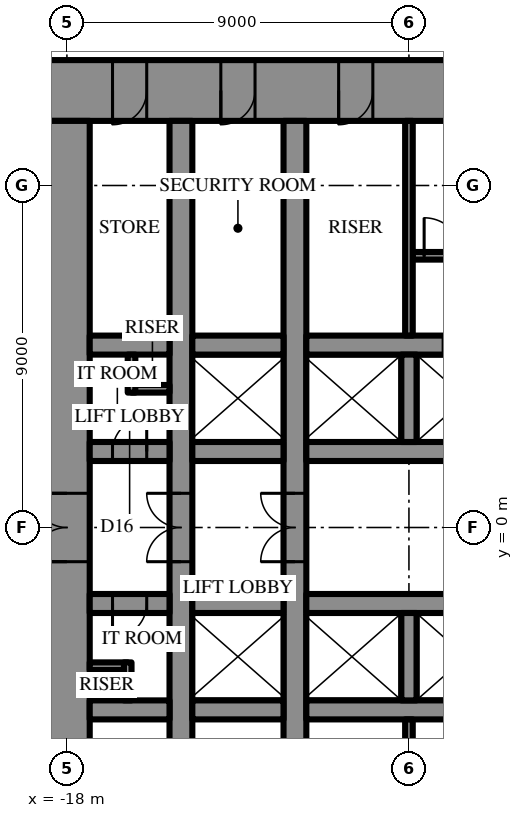
"""IFC4 building model, lengths in metres.
Left out: names, types, materials, properties, quantities, classifications, styles, units other than length and angle.
Written with IfcOpenShell. Run it as: python <this file> out.ifc"""

import sys

from ifc_helpers import new_model, si_unit, direction, frame, frame_2d, origin, place, context, subcontext, project, spatial, rectangle, extrude, element, fill, save


model = new_model("IFC4")
c1 = context("Model", 3, precision=1e-05, world=origin(), true_north=direction((0.0, 1.0)))
c2 = subcontext(c1, "Body", "Model", "MODEL_VIEW")
j1 = project(units=[si_unit("LENGTHUNIT", "METRE"), si_unit("PLANEANGLEUNIT", "RADIAN")], contexts=[c1])
p1 = place(None, origin())
s1 = spatial("IfcSite", under=j1, at=p1, CompositionType="ELEMENT")
p2 = place(p1, origin())
s2 = spatial("IfcBuilding", under=s1, at=p2, CompositionType="ELEMENT")
p3 = place(p2, frame((0.0, 0.0, 132.1)))
s3 = spatial("IfcBuildingStorey", under=s2, at=p3, CompositionType="ELEMENT", Elevation=132.1)
p4 = place(p3, frame((-18.6, 11.5, 0.0), z_axis=(0.0, 0.0, 1.0), x_axis=(1.0, 0.0, 0.0)))
e1 = element("IfcWall", 1, at=p4, inside=s3, PredefinedType="SHEAR", context=c2, shape_type="SweptSolid", body=[
    extrude(rectangle(XDim=37.2, YDim=1.6, at=frame_2d((18.6, 0.0))), origin(), (0.0, 0.0, 1.0), 4.2),
])
p5 = place(p4, frame((19.45, 0.0, 0.0)))
e2 = element("IfcOpeningElement", 2, at=p5, cuts=e1, PredefinedType="OPENING", context=c2, shape_type="SweptSolid", body=[
    extrude(rectangle(XDim=0.9, YDim=2.2, at=frame_2d((0.45, 1.1))), frame((0.0, 0.81, 0.0), z_axis=(0.0, -1.0, 0.0), x_axis=(1.0, 0.0, 0.0)), (0.0, 0.0, 1.0), 1.62),
])
p6 = place(p4, frame((22.45, 0.0, 0.0)))
e3 = element("IfcOpeningElement", 3, at=p6, cuts=e1, PredefinedType="OPENING", context=c2, shape_type="SweptSolid", body=[
    extrude(rectangle(XDim=0.9, YDim=2.2, at=frame_2d((0.45, 1.1))), frame((0.0, 0.81, 0.0), z_axis=(0.0, -1.0, 0.0), x_axis=(1.0, 0.0, 0.0)), (0.0, 0.0, 1.0), 1.62),
])
p7 = place(p4, frame((25.5, 0.0, 0.0)))
e4 = element("IfcOpeningElement", 4, at=p7, cuts=e1, PredefinedType="OPENING", context=c2, shape_type="SweptSolid", body=[
    extrude(rectangle(XDim=1.0, YDim=2.2, at=frame_2d((0.5, 1.1))), frame((0.0, 0.81, 0.0), z_axis=(0.0, -1.0, 0.0), x_axis=(1.0, 0.0, 0.0)), (0.0, 0.0, 1.0), 1.62),
])
p8 = place(p4, frame((1.8, 0.0, 0.0)))
e5 = element("IfcOpeningElement", 5, at=p8, cuts=e1, PredefinedType="OPENING", context=c2, shape_type="SweptSolid", body=[
    extrude(rectangle(XDim=0.9, YDim=2.2, at=frame_2d((0.45, 1.1))), frame((0.0, 0.81, 0.0), z_axis=(0.0, -1.0, 0.0), x_axis=(1.0, 0.0, 0.0)), (0.0, 0.0, 1.0), 1.62),
])
p9 = place(p4, frame((4.65, 0.0, 0.0)))
e6 = element("IfcOpeningElement", 6, at=p9, cuts=e1, PredefinedType="OPENING", context=c2, shape_type="SweptSolid", body=[
    extrude(rectangle(XDim=0.9, YDim=2.2, at=frame_2d((0.45, 1.1))), frame((0.0, 0.81, 0.0), z_axis=(0.0, -1.0, 0.0), x_axis=(1.0, 0.0, 0.0)), (0.0, 0.0, 1.0), 1.62),
])
p10 = place(p4, frame((7.75, 0.0, 0.0)))
e7 = element("IfcOpeningElement", 7, at=p10, cuts=e1, PredefinedType="OPENING", context=c2, shape_type="SweptSolid", body=[
    extrude(rectangle(XDim=0.9, YDim=2.2, at=frame_2d((0.45, 1.1))), frame((0.0, 0.81, 0.0), z_axis=(0.0, -1.0, 0.0), x_axis=(1.0, 0.0, 0.0)), (0.0, 0.0, 1.0), 1.62),
])
p11 = place(p4, frame((28.55, 0.0, 0.0)))
e8 = element("IfcOpeningElement", 8, at=p11, cuts=e1, PredefinedType="OPENING", context=c2, shape_type="SweptSolid", body=[
    extrude(rectangle(XDim=0.9, YDim=2.2, at=frame_2d((0.45, 1.1))), frame((0.0, 0.81, 0.0), z_axis=(0.0, -1.0, 0.0), x_axis=(1.0, 0.0, 0.0)), (0.0, 0.0, 1.0), 1.62),
])
p12 = place(p4, frame((31.65, 0.0, 0.0)))
e9 = element("IfcOpeningElement", 9, at=p12, cuts=e1, PredefinedType="OPENING", context=c2, shape_type="SweptSolid", body=[
    extrude(rectangle(XDim=0.9, YDim=2.2, at=frame_2d((0.45, 1.1))), frame((0.0, 0.81, 0.0), z_axis=(0.0, -1.0, 0.0), x_axis=(1.0, 0.0, 0.0)), (0.0, 0.0, 1.0), 1.62),
])
p13 = place(p4, frame((34.5, 0.0, 0.0)))
e10 = element("IfcOpeningElement", 10, at=p13, cuts=e1, PredefinedType="OPENING", context=c2, shape_type="SweptSolid", body=[
    extrude(rectangle(XDim=0.9, YDim=2.2, at=frame_2d((0.45, 1.1))), frame((0.0, 0.81, 0.0), z_axis=(0.0, -1.0, 0.0), x_axis=(1.0, 0.0, 0.0)), (0.0, 0.0, 1.0), 1.62),
])
p14 = place(p3, frame((-18.0, 10.7, 0.0), z_axis=(0.0, 0.0, 1.0), x_axis=(0.0, -1.0, 0.0)))
e11 = element("IfcWall", 11, at=p14, inside=s3, PredefinedType="SHEAR", context=c2, shape_type="SweptSolid", body=[
    extrude(rectangle(XDim=21.4, YDim=1.2, at=frame_2d((10.7, 0.0))), origin(), (0.0, 0.0, 1.0), 4.2),
])
p15 = place(p14, frame((9.8, 0.0, 0.0)))
e12 = element("IfcOpeningElement", 12, at=p15, cuts=e11, PredefinedType="OPENING", context=c2, shape_type="SweptSolid", body=[
    extrude(rectangle(XDim=1.8, YDim=2.4, at=frame_2d((0.9, 1.2))), frame((0.0, 0.61, 0.0), z_axis=(0.0, -1.0, 0.0), x_axis=(1.0, 0.0, 0.0)), (0.0, 0.0, 1.0), 1.22),
])
p16 = place(p3, frame((-12.0, -10.7, 0.0), z_axis=(0.0, 0.0, 1.0), x_axis=(0.0, 1.0, 0.0)))
e13 = element("IfcWall", 13, at=p16, inside=s3, PredefinedType="SHEAR", context=c2, shape_type="SweptSolid", body=[
    extrude(rectangle(XDim=21.4, YDim=0.6, at=frame_2d((10.7, 0.0))), origin(), (0.0, 0.0, 1.0), 4.2),
])
p17 = place(p16, frame((9.8, 0.0, 0.0)))
e14 = element("IfcOpeningElement", 14, at=p17, cuts=e13, PredefinedType="OPENING", context=c2, shape_type="SweptSolid", body=[
    extrude(rectangle(XDim=1.8, YDim=2.4, at=frame_2d((0.9, 1.2))), frame((0.0, 0.31, 0.0), z_axis=(0.0, -1.0, 0.0), x_axis=(1.0, 0.0, 0.0)), (0.0, 0.0, 1.0), 0.62),
])
p18 = place(p3, frame((-15.0, -10.7, 0.0), z_axis=(0.0, 0.0, 1.0), x_axis=(0.0, 1.0, 0.0)))
e15 = element("IfcWall", 15, at=p18, inside=s3, PredefinedType="SHEAR", context=c2, shape_type="SweptSolid", body=[
    extrude(rectangle(XDim=21.4, YDim=0.6, at=frame_2d((10.7, 0.0))), origin(), (0.0, 0.0, 1.0), 4.2),
])
p19 = place(p18, frame((9.8, 0.0, 0.0)))
e16 = element("IfcOpeningElement", 16, at=p19, cuts=e15, PredefinedType="OPENING", context=c2, shape_type="SweptSolid", body=[
    extrude(rectangle(XDim=1.8, YDim=2.4, at=frame_2d((0.9, 1.2))), frame((0.0, 0.31, 0.0), z_axis=(0.0, -1.0, 0.0), x_axis=(1.0, 0.0, 0.0)), (0.0, 0.0, 1.0), 0.62),
])
p20 = place(p3, frame((-17.4, 2.0, 0.0), z_axis=(0.0, 0.0, 1.0), x_axis=(1.0, 0.0, 0.0)))
e17 = element("IfcWall", 17, at=p20, inside=s3, PredefinedType="SHEAR", context=c2, shape_type="SweptSolid", body=[
    extrude(rectangle(XDim=2.1, YDim=0.5, at=frame_2d((1.05, 0.0))), origin(), (0.0, 0.0, 1.0), 4.2),
])
p21 = place(p20, frame((0.6, 0.0, 0.0)))
e18 = element("IfcOpeningElement", 18, at=p21, cuts=e17, PredefinedType="OPENING", context=c2, shape_type="SweptSolid", body=[
    extrude(rectangle(XDim=0.9, YDim=2.2, at=frame_2d((0.45, 1.1))), frame((0.0, 0.26, 0.0), z_axis=(0.0, -1.0, 0.0), x_axis=(1.0, 0.0, 0.0)), (0.0, 0.0, 1.0), 0.52),
])
p22 = place(p3, frame((-14.7, 2.0, 0.0), z_axis=(0.0, 0.0, 1.0), x_axis=(1.0, 0.0, 0.0)))
e19 = element("IfcWall", 19, at=p22, inside=s3, PredefinedType="SHEAR", context=c2, shape_type="SweptSolid", body=[
    extrude(rectangle(XDim=2.4, YDim=0.5, at=frame_2d((1.2, 0.0))), origin(), (0.0, 0.0, 1.0), 4.2),
])
p23 = place(p3, frame((-11.7, 2.0, 0.0), z_axis=(0.0, 0.0, 1.0), x_axis=(1.0, 0.0, 0.0)))
e20 = element("IfcWall", 20, at=p23, inside=s3, PredefinedType="SHEAR", context=c2, shape_type="SweptSolid", body=[
    extrude(rectangle(XDim=5.9, YDim=0.5, at=frame_2d((2.95, 0.0))), origin(), (0.0, 0.0, 1.0), 4.2),
])
p24 = place(p3, frame((-17.4, 4.8, 0.0), z_axis=(0.0, 0.0, 1.0), x_axis=(1.0, 0.0, 0.0)))
e21 = element("IfcWall", 21, at=p24, inside=s3, PredefinedType="SHEAR", context=c2, shape_type="SweptSolid", body=[
    extrude(rectangle(XDim=2.1, YDim=0.5, at=frame_2d((1.05, 0.0))), origin(), (0.0, 0.0, 1.0), 4.2),
])
p25 = place(p3, frame((-14.7, 4.8, 0.0), z_axis=(0.0, 0.0, 1.0), x_axis=(1.0, 0.0, 0.0)))
e22 = element("IfcWall", 22, at=p25, inside=s3, PredefinedType="SHEAR", context=c2, shape_type="SweptSolid", body=[
    extrude(rectangle(XDim=2.4, YDim=0.5, at=frame_2d((1.2, 0.0))), origin(), (0.0, 0.0, 1.0), 4.2),
])
p26 = place(p3, frame((-11.7, 4.8, 0.0), z_axis=(0.0, 0.0, 1.0), x_axis=(1.0, 0.0, 0.0)))
e23 = element("IfcWall", 23, at=p26, inside=s3, PredefinedType="SHEAR", context=c2, shape_type="SweptSolid", body=[
    extrude(rectangle(XDim=23.4, YDim=0.5, at=frame_2d((11.7, 0.0))), origin(), (0.0, 0.0, 1.0), 4.2),
])
p27 = place(p26, frame((6.6, 0.0, 0.0)))
e24 = element("IfcOpeningElement", 24, at=p27, cuts=e23, PredefinedType="OPENING", context=c2, shape_type="SweptSolid", body=[
    extrude(rectangle(XDim=1.2, YDim=2.2, at=frame_2d((0.6, 1.1))), frame((0.0, 0.26, 0.0), z_axis=(0.0, -1.0, 0.0), x_axis=(1.0, 0.0, 0.0)), (0.0, 0.0, 1.0), 0.52),
])
p28 = place(p26, frame((3.6, 0.0, 0.0)))
e25 = element("IfcOpeningElement", 25, at=p28, cuts=e23, PredefinedType="OPENING", context=c2, shape_type="SweptSolid", body=[
    extrude(rectangle(XDim=1.2, YDim=2.2, at=frame_2d((0.6, 1.1))), frame((0.0, 0.26, 0.0), z_axis=(0.0, -1.0, 0.0), x_axis=(1.0, 0.0, 0.0)), (0.0, 0.0, 1.0), 0.52),
])
p29 = place(p3, frame((-9.0, 2.25, 0.0), z_axis=(0.0, 0.0, 1.0), x_axis=(0.0, 1.0, 0.0)))
e26 = element("IfcWall", 26, at=p29, inside=s3, PredefinedType="SHEAR", context=c2, shape_type="SweptSolid", body=[
    extrude(rectangle(XDim=2.3, YDim=0.4, at=frame_2d((1.15, 0.0))), origin(), (0.0, 0.0, 1.0), 4.2),
])
p30 = place(p3, frame((-8.9, 7.15, 0.0), z_axis=(0.0, 0.0, 1.0), x_axis=(1.0, 0.0, 0.0)))
e27 = element("IfcWall", 27, at=p30, inside=s3, PredefinedType="SHEAR", context=c2, shape_type="SweptSolid", body=[
    extrude(rectangle(XDim=8.6, YDim=0.2, at=frame_2d((4.3, 0.0))), origin(), (0.0, 0.0, 1.0), 4.2),
])
p31 = place(p30, frame((0.3, 0.0, 0.0)))
e28 = element("IfcOpeningElement", 28, at=p31, cuts=e27, PredefinedType="OPENING", context=c2, shape_type="SweptSolid", body=[
    extrude(rectangle(XDim=1.0, YDim=2.2, at=frame_2d((0.5, 1.1))), frame((0.0, 0.11, 0.0), z_axis=(0.0, -1.0, 0.0), x_axis=(1.0, 0.0, 0.0)), (0.0, 0.0, 1.0), 0.22),
])
p32 = place(p3, frame((3.2, -2.0, 0.0), z_axis=(0.0, 0.0, 1.0), x_axis=(-1.0, 0.0, 0.0)))
e29 = element("IfcWall", 29, at=p32, inside=s3, PredefinedType="SHEAR", context=c2, shape_type="SweptSolid", body=[
    extrude(rectangle(XDim=14.9, YDim=0.5, at=frame_2d((7.45, 0.0))), origin(), (0.0, 0.0, 1.0), 4.2),
])
p33 = place(p32, frame((1.15, 0.0, 0.0)))
e30 = element("IfcOpeningElement", 30, at=p33, cuts=e29, PredefinedType="OPENING", context=c2, shape_type="SweptSolid", body=[
    extrude(rectangle(XDim=1.1, YDim=2.2, at=frame_2d((0.55, 1.1))), frame((0.0, 0.26, 0.0), z_axis=(0.0, -1.0, 0.0), x_axis=(1.0, 0.0, 0.0)), (0.0, 0.0, 1.0), 0.52),
])
p34 = place(p32, frame((4.15, 0.0, 0.0)))
e31 = element("IfcOpeningElement", 31, at=p34, cuts=e29, PredefinedType="OPENING", context=c2, shape_type="SweptSolid", body=[
    extrude(rectangle(XDim=1.1, YDim=2.2, at=frame_2d((0.55, 1.1))), frame((0.0, 0.26, 0.0), z_axis=(0.0, -1.0, 0.0), x_axis=(1.0, 0.0, 0.0)), (0.0, 0.0, 1.0), 0.52),
])
p35 = place(p32, frame((7.15, 0.0, 0.0)))
e32 = element("IfcOpeningElement", 32, at=p35, cuts=e29, PredefinedType="OPENING", context=c2, shape_type="SweptSolid", body=[
    extrude(rectangle(XDim=1.1, YDim=2.2, at=frame_2d((0.55, 1.1))), frame((0.0, 0.26, 0.0), z_axis=(0.0, -1.0, 0.0), x_axis=(1.0, 0.0, 0.0)), (0.0, 0.0, 1.0), 0.52),
])
p36 = place(p32, frame((10.15, 0.0, 0.0)))
e33 = element("IfcOpeningElement", 33, at=p36, cuts=e29, PredefinedType="OPENING", context=c2, shape_type="SweptSolid", body=[
    extrude(rectangle(XDim=1.1, YDim=2.2, at=frame_2d((0.55, 1.1))), frame((0.0, 0.26, 0.0), z_axis=(0.0, -1.0, 0.0), x_axis=(1.0, 0.0, 0.0)), (0.0, 0.0, 1.0), 0.52),
])
p37 = place(p3, frame((-12.3, -2.0, 0.0), z_axis=(0.0, 0.0, 1.0), x_axis=(-1.0, 0.0, 0.0)))
e34 = element("IfcWall", 34, at=p37, inside=s3, PredefinedType="SHEAR", context=c2, shape_type="SweptSolid", body=[
    extrude(rectangle(XDim=2.4, YDim=0.5, at=frame_2d((1.2, 0.0))), origin(), (0.0, 0.0, 1.0), 4.2),
])
p38 = place(p3, frame((-15.3, -2.0, 0.0), z_axis=(0.0, 0.0, 1.0), x_axis=(-1.0, 0.0, 0.0)))
e35 = element("IfcWall", 35, at=p38, inside=s3, PredefinedType="SHEAR", context=c2, shape_type="SweptSolid", body=[
    extrude(rectangle(XDim=2.1, YDim=0.5, at=frame_2d((1.05, 0.0))), origin(), (0.0, 0.0, 1.0), 4.2),
])
p39 = place(p38, frame((0.6, 0.0, 0.0)))
e36 = element("IfcOpeningElement", 36, at=p39, cuts=e35, PredefinedType="OPENING", context=c2, shape_type="SweptSolid", body=[
    extrude(rectangle(XDim=0.9, YDim=2.2, at=frame_2d((0.45, 1.1))), frame((0.0, 0.26, 0.0), z_axis=(0.0, -1.0, 0.0), x_axis=(1.0, 0.0, 0.0)), (0.0, 0.0, 1.0), 0.52),
])
p40 = place(p3, frame((11.7, -4.8, 0.0), z_axis=(0.0, 0.0, 1.0), x_axis=(-1.0, 0.0, 0.0)))
e37 = element("IfcWall", 37, at=p40, inside=s3, PredefinedType="SHEAR", context=c2, shape_type="SweptSolid", body=[
    extrude(rectangle(XDim=23.4, YDim=0.5, at=frame_2d((11.7, 0.0))), origin(), (0.0, 0.0, 1.0), 4.2),
])
p41 = place(p40, frame((6.6, 0.0, 0.0)))
e38 = element("IfcOpeningElement", 38, at=p41, cuts=e37, PredefinedType="OPENING", context=c2, shape_type="SweptSolid", body=[
    extrude(rectangle(XDim=1.2, YDim=2.2, at=frame_2d((0.6, 1.1))), frame((0.0, 0.26, 0.0), z_axis=(0.0, -1.0, 0.0), x_axis=(1.0, 0.0, 0.0)), (0.0, 0.0, 1.0), 0.52),
])
p42 = place(p40, frame((3.6, 0.0, 0.0)))
e39 = element("IfcOpeningElement", 39, at=p42, cuts=e37, PredefinedType="OPENING", context=c2, shape_type="SweptSolid", body=[
    extrude(rectangle(XDim=1.2, YDim=2.2, at=frame_2d((0.6, 1.1))), frame((0.0, 0.26, 0.0), z_axis=(0.0, -1.0, 0.0), x_axis=(1.0, 0.0, 0.0)), (0.0, 0.0, 1.0), 0.52),
])
p43 = place(p3, frame((-12.3, -4.8, 0.0), z_axis=(0.0, 0.0, 1.0), x_axis=(-1.0, 0.0, 0.0)))
e40 = element("IfcWall", 40, at=p43, inside=s3, PredefinedType="SHEAR", context=c2, shape_type="SweptSolid", body=[
    extrude(rectangle(XDim=2.4, YDim=0.5, at=frame_2d((1.2, 0.0))), origin(), (0.0, 0.0, 1.0), 4.2),
])
p44 = place(p3, frame((-15.3, -4.8, 0.0), z_axis=(0.0, 0.0, 1.0), x_axis=(-1.0, 0.0, 0.0)))
e41 = element("IfcWall", 41, at=p44, inside=s3, PredefinedType="SHEAR", context=c2, shape_type="SweptSolid", body=[
    extrude(rectangle(XDim=2.1, YDim=0.5, at=frame_2d((1.05, 0.0))), origin(), (0.0, 0.0, 1.0), 4.2),
])
p45 = place(p3, frame((-9.0, -2.25, 0.0), z_axis=(0.0, 0.0, 1.0), x_axis=(0.0, -1.0, 0.0)))
e42 = element("IfcWall", 42, at=p45, inside=s3, PredefinedType="SHEAR", context=c2, shape_type="SweptSolid", body=[
    extrude(rectangle(XDim=2.3, YDim=0.4, at=frame_2d((1.15, 0.0))), origin(), (0.0, 0.0, 1.0), 4.2),
])
for number, where, z_axis, x_axis in (
    (43, (-9.0, 5.05, 0.0), (0.0, 0.0, 1.0), (0.0, 1.0, 0.0)),
    (44, (-9.0, -5.05, 0.0), (0.0, 0.0, 1.0), (0.0, -1.0, 0.0)),
):
    element("IfcWall", number, at=place(p3, frame(where, z_axis=z_axis, x_axis=x_axis)), inside=s3, PredefinedType="PARTITIONING", context=c2, shape_type="SweptSolid", body=[
        extrude(rectangle(XDim=5.65, YDim=0.2, at=frame_2d((2.825, 0.0))), origin(), (0.0, 0.0, 1.0), 4.0),
    ])
for number, where, z_axis, x_axis in (
    (45, (-16.3, 3.65, 0.0), (0.0, 0.0, 1.0), (1.0, 0.0, 0.0)),
    (46, (-16.3, 3.55, 0.0), (0.0, 0.0, 1.0), (0.0, 1.0, 0.0)),
    (47, (-16.4, -3.65, 0.0), (0.0, 0.0, 1.0), (-1.0, 0.0, 0.0)),
    (48, (-16.4, -3.55, 0.0), (0.0, 0.0, 1.0), (0.0, -1.0, 0.0)),
):
    element("IfcWall", number, at=place(p3, frame(where, z_axis=z_axis, x_axis=x_axis)), inside=s3, PredefinedType="PARTITIONING", context=c2, shape_type="SweptSolid", body=[
        extrude(rectangle(XDim=1.0, YDim=0.2, at=frame_2d((0.5, 0.0))), origin(), (0.0, 0.0, 1.0), 4.0),
    ])
p46 = place(p15, frame((1.8, 0.0, 0.0), z_axis=(0.0, 0.0, 1.0), x_axis=(-1.0, 0.0, 0.0)))
e49 = element("IfcDoor", 49, at=p46, inside=s3, OperationType="DOUBLE_DOOR_SINGLE_SWING", PredefinedType="DOOR", context=c2, shape_type="SweptSolid", body=[
    extrude(rectangle(XDim=1.8, YDim=2.4, at=frame_2d((0.9, 1.2))), frame((0.0, 0.025, 0.0), z_axis=(0.0, -1.0, 0.0), x_axis=(1.0, 0.0, 0.0)), (0.0, 0.0, 1.0), 0.05),
])
fill(e12, e49)
p47 = place(p31, origin())
e50 = element("IfcDoor", 50, at=p47, inside=s3, OperationType="SINGLE_SWING_RIGHT", PredefinedType="DOOR", context=c2, shape_type="SweptSolid", body=[
    extrude(rectangle(XDim=1.0, YDim=2.2, at=frame_2d((0.5, 1.1))), frame((0.0, 0.025, 0.0), z_axis=(0.0, -1.0, 0.0), x_axis=(1.0, 0.0, 0.0)), (0.0, 0.0, 1.0), 0.05),
])
fill(e28, e50)
p48 = place(p8, frame((0.9, 0.0, 0.0), z_axis=(0.0, 0.0, 1.0), x_axis=(-1.0, 0.0, 0.0)))
e51 = element("IfcDoor", 51, at=p48, inside=s3, OperationType="SINGLE_SWING_LEFT", PredefinedType="DOOR", context=c2, shape_type="SweptSolid", body=[
    extrude(rectangle(XDim=0.9, YDim=2.2, at=frame_2d((0.45, 1.1))), frame((0.0, 0.025, 0.0), z_axis=(0.0, -1.0, 0.0), x_axis=(1.0, 0.0, 0.0)), (0.0, 0.0, 1.0), 0.05),
])
fill(e5, e51)
p49 = place(p9, frame((0.9, 0.0, 0.0), z_axis=(0.0, 0.0, 1.0), x_axis=(-1.0, 0.0, 0.0)))
e52 = element("IfcDoor", 52, at=p49, inside=s3, OperationType="SINGLE_SWING_LEFT", PredefinedType="DOOR", context=c2, shape_type="SweptSolid", body=[
    extrude(rectangle(XDim=0.9, YDim=2.2, at=frame_2d((0.45, 1.1))), frame((0.0, 0.025, 0.0), z_axis=(0.0, -1.0, 0.0), x_axis=(1.0, 0.0, 0.0)), (0.0, 0.0, 1.0), 0.05),
])
fill(e6, e52)
p50 = place(p10, frame((0.9, 0.0, 0.0), z_axis=(0.0, 0.0, 1.0), x_axis=(-1.0, 0.0, 0.0)))
e53 = element("IfcDoor", 53, at=p50, inside=s3, OperationType="SINGLE_SWING_LEFT", PredefinedType="DOOR", context=c2, shape_type="SweptSolid", body=[
    extrude(rectangle(XDim=0.9, YDim=2.2, at=frame_2d((0.45, 1.1))), frame((0.0, 0.025, 0.0), z_axis=(0.0, -1.0, 0.0), x_axis=(1.0, 0.0, 0.0)), (0.0, 0.0, 1.0), 0.05),
])
fill(e7, e53)
p51 = place(p21, origin())
e54 = element("IfcDoor", 54, at=p51, inside=s3, OperationType="SINGLE_SWING_LEFT", PredefinedType="DOOR", context=c2, shape_type="SweptSolid", body=[
    extrude(rectangle(XDim=0.9, YDim=2.2, at=frame_2d((0.45, 1.1))), frame((0.0, 0.025, 0.0), z_axis=(0.0, -1.0, 0.0), x_axis=(1.0, 0.0, 0.0)), (0.0, 0.0, 1.0), 0.05),
])
fill(e18, e54)
p52 = place(p39, origin())
e55 = element("IfcDoor", 55, at=p52, inside=s3, OperationType="SINGLE_SWING_LEFT", PredefinedType="DOOR", context=c2, shape_type="SweptSolid", body=[
    extrude(rectangle(XDim=0.9, YDim=2.2, at=frame_2d((0.45, 1.1))), frame((0.0, 0.025, 0.0), z_axis=(0.0, -1.0, 0.0), x_axis=(1.0, 0.0, 0.0)), (0.0, 0.0, 1.0), 0.05),
])
fill(e36, e55)
p53 = place(p17, origin())
e56 = element("IfcDoor", 56, at=p53, inside=s3, OperationType="DOUBLE_DOOR_SINGLE_SWING", PredefinedType="DOOR", context=c2, shape_type="SweptSolid", body=[
    extrude(rectangle(XDim=1.8, YDim=2.4, at=frame_2d((0.9, 1.2))), frame((0.0, 0.025, 0.0), z_axis=(0.0, -1.0, 0.0), x_axis=(1.0, 0.0, 0.0)), (0.0, 0.0, 1.0), 0.05),
])
fill(e14, e56)
p54 = place(p19, origin())
e57 = element("IfcDoor", 57, at=p54, inside=s3, OperationType="DOUBLE_DOOR_SINGLE_SWING", PredefinedType="DOOR", context=c2, shape_type="SweptSolid", body=[
    extrude(rectangle(XDim=1.8, YDim=2.4, at=frame_2d((0.9, 1.2))), frame((0.0, 0.025, 0.0), z_axis=(0.0, -1.0, 0.0), x_axis=(1.0, 0.0, 0.0)), (0.0, 0.0, 1.0), 0.05),
])
fill(e16, e57)
save(model, sys.argv[1])
